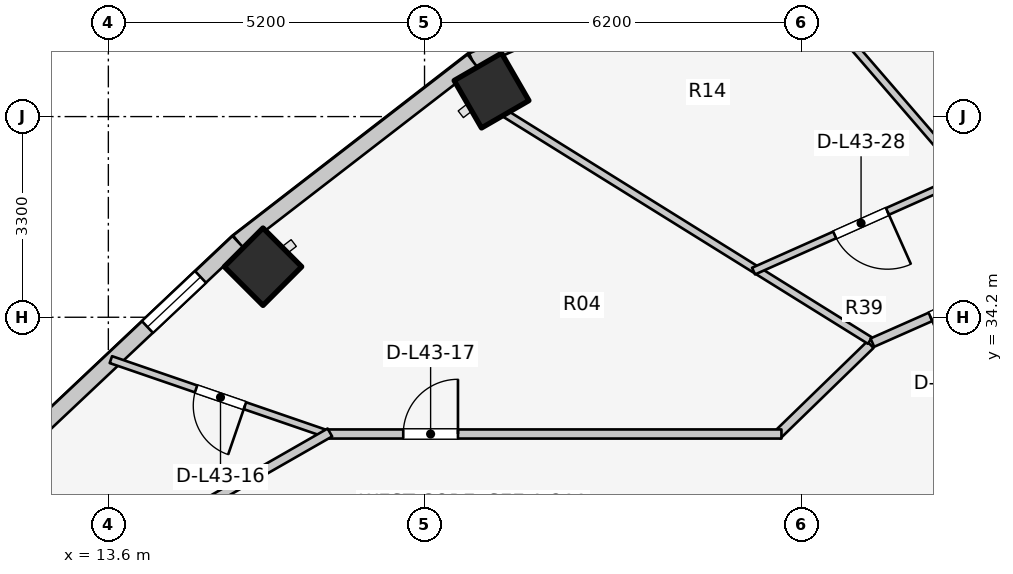
"""IFC4 building model, lengths in metres.
Left out: names, types, materials, properties, quantities, classifications, styles, units other than length and angle.
Written with IfcOpenShell. Run it as: python <this file> out.ifc"""

import sys

from ifc_helpers import new_model, si_unit, direction, frame, frame_2d, origin, origin_2d, place, context, subcontext, project, spatial, rectangle, extrude, element, fill, save


model = new_model("IFC4")
c1 = context("Model", 3, precision=1e-05, world=origin(), true_north=direction((0.0, 1.0)))
c2 = subcontext(c1, "Body", "Model", "MODEL_VIEW")
j1 = project(units=[si_unit("LENGTHUNIT", "METRE"), si_unit("PLANEANGLEUNIT", "RADIAN")], contexts=[c1])
p1 = place(None, origin())
s1 = spatial("IfcSite", under=j1, at=p1, CompositionType="ELEMENT")
p2 = place(p1, origin())
s2 = spatial("IfcBuilding", under=s1, at=p2, CompositionType="ELEMENT")
p3 = place(p2, frame((0.0, 0.0, 143.6)))
s3 = spatial("IfcBuildingStorey", under=s2, at=p3, CompositionType="ELEMENT", Elevation=143.6)
for number, where, z_axis, x_axis in (
    (1, (19.902, 37.928, 0.0), (0.0, 0.0, 1.0), (-0.5, 0.866, 0.0)),
    (2, (16.143, 35.031, 0.0), (0.0, 0.0, 1.0), (-0.707, 0.707, 0.0)),
):
    element("IfcColumn", number, at=place(p3, frame(where, z_axis=z_axis, x_axis=x_axis)), inside=s3, PredefinedType="COLUMN", context=c2, shape_type="SweptSolid", body=[
        extrude(rectangle(XDim=0.9, YDim=0.9, at=origin_2d()), origin(), (0.0, 0.0, 1.0), 3.1),
    ])
p4 = place(p3, frame((24.635, 40.685, 0.0), z_axis=(0.0, 0.0, 1.0), x_axis=(-0.912353637112, -0.409403029847, 0.0)))
e3 = element("IfcWall", 3, at=p4, inside=s3, PredefinedType="STANDARD", context=c2, shape_type="SweptSolid", body=[
    extrude(rectangle(XDim=5.533, YDim=0.26, at=frame_2d((2.766, 0.0))), origin(), (0.0, 0.0, 1.0), 2.85),
])
p5 = place(p4, frame((2.016, 0.0, 0.75)))
e4 = element("IfcOpeningElement", 4, at=p5, cuts=e3, PredefinedType="OPENING", context=c2, shape_type="SweptSolid", body=[
    extrude(rectangle(XDim=1.5, YDim=1.6, at=frame_2d((0.75, 0.8))), frame((0.0, 0.14, 0.0), z_axis=(0.0, -1.0, 0.0), x_axis=(1.0, 0.0, 0.0)), (0.0, 0.0, 1.0), 0.28),
])
p6 = place(p3, frame((19.587, 38.419, 0.0), z_axis=(0.0, 0.0, 1.0), x_axis=(-0.791460185804, -0.611220724687, 0.0)))
e5 = element("IfcWall", 5, at=p6, inside=s3, PredefinedType="STANDARD", context=c2, shape_type="SweptSolid", body=[
    extrude(rectangle(XDim=4.872, YDim=0.26, at=frame_2d((2.436, 0.0))), origin(), (0.0, 0.0, 1.0), 2.85),
])
p7 = place(p3, frame((15.731, 35.441, 0.0), z_axis=(0.0, 0.0, 1.0), x_axis=(-0.727667301037, -0.68593024354, 0.0)))
e6 = element("IfcWall", 6, at=p7, inside=s3, PredefinedType="STANDARD", context=c2, shape_type="SweptSolid", body=[
    extrude(rectangle(XDim=4.604, YDim=0.26, at=frame_2d((2.302, 0.0))), origin(), (0.0, 0.0, 1.0), 2.85),
])
p8 = place(p7, frame((0.844, 0.0, 0.75)))
e7 = element("IfcOpeningElement", 7, at=p8, cuts=e6, PredefinedType="OPENING", context=c2, shape_type="SweptSolid", body=[
    extrude(rectangle(XDim=1.2, YDim=1.5, at=frame_2d((0.6, 0.75))), frame((0.0, 0.14, 0.0), z_axis=(0.0, -1.0, 0.0), x_axis=(1.0, 0.0, 0.0)), (0.0, 0.0, 1.0), 0.28),
])
p9 = place(p3, frame((17.247, 32.264, 0.0), z_axis=(0.0, 0.0, 1.0), x_axis=(-0.945683523506, 0.325088716151, 0.0)))
e8 = element("IfcWall", 8, at=p9, inside=s3, PredefinedType="MOVABLE", context=c2, shape_type="SweptSolid", body=[
    extrude(rectangle(XDim=3.813, YDim=0.12, at=frame_2d((1.906, 0.0))), origin(), (0.0, 0.0, 1.0), 2.22),
])
p10 = place(p9, frame((1.481, 0.0, 0.0)))
e9 = element("IfcOpeningElement", 9, at=p10, cuts=e8, PredefinedType="OPENING", context=c2, shape_type="SweptSolid", body=[
    extrude(rectangle(XDim=0.85, YDim=2.05, at=frame_2d((0.425, 1.025))), frame((0.0, 0.07, 0.0), z_axis=(0.0, -1.0, 0.0), x_axis=(1.0, 0.0, 0.0)), (0.0, 0.0, 1.0), 0.14),
])
p11 = place(p3, frame((26.133, 33.749, 0.0), z_axis=(0.0, 0.0, 1.0), x_axis=(-0.717419568599, -0.696641344302, 0.0)))
e10 = element("IfcWall", 10, at=p11, inside=s3, PredefinedType="PARTITIONING", context=c2, shape_type="SweptSolid", body=[
    extrude(rectangle(XDim=2.138, YDim=0.15, at=frame_2d((1.069, 0.0))), origin(), (0.0, 0.0, 1.0), 2.299),
])
p12 = place(p3, frame((17.15, 32.28, 0.0), z_axis=(0.0, 0.0, 1.0), x_axis=(1.0, 0.0, 0.0)))
e11 = element("IfcWall", 11, at=p12, inside=s3, PredefinedType="PARTITIONING", context=c2, shape_type="SweptSolid", body=[
    extrude(rectangle(XDim=7.52, YDim=0.15, at=frame_2d((3.76, 0.0))), origin(), (0.0, 0.0, 1.0), 2.299),
])
p13 = place(p12, frame((1.3, 0.0, 0.0)))
e12 = element("IfcOpeningElement", 12, at=p13, cuts=e11, PredefinedType="OPENING", context=c2, shape_type="SweptSolid", body=[
    extrude(rectangle(XDim=0.9, YDim=2.1, at=frame_2d((0.45, 1.05))), frame((0.0, 0.085, 0.0), z_axis=(0.0, -1.0, 0.0), x_axis=(1.0, 0.0, 0.0)), (0.0, 0.0, 1.0), 0.17),
])
p14 = place(p3, frame((17.243, 32.305, 0.0), z_axis=(0.0, 0.0, 1.0), x_axis=(-0.867991349648, -0.496579315857, 0.0)))
e13 = element("IfcWall", 13, at=p14, inside=s3, PredefinedType="PARTITIONING", context=c2, shape_type="SweptSolid", body=[
    extrude(rectangle(XDim=2.567, YDim=0.15, at=frame_2d((1.283, 0.0))), origin(), (0.0, 0.0, 1.0), 2.22),
])
p15 = place(p3, frame((28.947, 35.073, 0.0), z_axis=(0.0, 0.0, 1.0), x_axis=(-0.653779283332, 0.756685303601, 0.0)))
e14 = element("IfcWall", 14, at=p15, inside=s3, PredefinedType="PARTITIONING", context=c2, shape_type="SweptSolid", body=[
    extrude(rectangle(XDim=6.14, YDim=0.125, at=frame_2d((3.07, 0.0))), origin(), (0.0, 0.0, 1.0), 2.299),
])
p16 = place(p3, frame((26.125, 33.816, 0.0), z_axis=(0.0, 0.0, 1.0), x_axis=(-0.849008457073, 0.528379257559, 0.0)))
e15 = element("IfcWall", 15, at=p16, inside=s3, PredefinedType="PARTITIONING", context=c2, shape_type="SweptSolid", body=[
    extrude(rectangle(XDim=7.077, YDim=0.125, at=frame_2d((3.539, 0.0))), origin(), (0.0, 0.0, 1.0), 2.299),
])
p17 = place(p3, frame((27.748, 36.535, 0.0), z_axis=(0.0, 0.0, 1.0), x_axis=(-0.913405492862, -0.407050863665, 0.0)))
e16 = element("IfcWall", 16, at=p17, inside=s3, PredefinedType="MOVABLE", context=c2, shape_type="SweptSolid", body=[
    extrude(rectangle(XDim=3.872, YDim=0.12, at=frame_2d((1.936, 0.0))), origin(), (0.0, 0.0, 1.0), 2.299),
])
p18 = place(p17, frame((1.461, 0.0, 0.0)))
e17 = element("IfcOpeningElement", 17, at=p18, cuts=e16, PredefinedType="OPENING", context=c2, shape_type="SweptSolid", body=[
    extrude(rectangle(XDim=0.95, YDim=2.1, at=frame_2d((0.475, 1.05))), frame((0.0, 0.07, 0.0), z_axis=(0.0, -1.0, 0.0), x_axis=(1.0, 0.0, 0.0)), (0.0, 0.0, 1.0), 0.14),
])
p19 = place(p3, frame((28.991, 35.034, 0.0), z_axis=(0.0, 0.0, 1.0), x_axis=(-0.91445214467, -0.404694051239, 0.0)))
e18 = element("IfcWall", 18, at=p19, inside=s3, PredefinedType="PARTITIONING", context=c2, shape_type="SweptSolid", body=[
    extrude(rectangle(XDim=3.091, YDim=0.15, at=frame_2d((1.545, 0.0))), origin(), (0.0, 0.0, 1.0), 2.299),
])
p20 = place(p19, frame((1.045, 0.0, 0.0)))
e19 = element("IfcOpeningElement", 19, at=p20, cuts=e18, PredefinedType="OPENING", context=c2, shape_type="SweptSolid", body=[
    extrude(rectangle(XDim=1.0, YDim=2.1, at=frame_2d((0.5, 1.05))), frame((0.0, 0.085, 0.0), z_axis=(0.0, -1.0, 0.0), x_axis=(1.0, 0.0, 0.0)), (0.0, 0.0, 1.0), 0.17),
])
p21 = place(p8, origin())
e20 = element("IfcWindow", 20, at=p21, inside=s3, PartitioningType="SINGLE_PANEL", PredefinedType="WINDOW", context=c2, shape_type="SweptSolid", body=[
    extrude(rectangle(XDim=1.2, YDim=1.5, at=frame_2d((0.6, 0.75))), frame((0.0, 0.03, 0.0), z_axis=(0.0, -1.0, 0.0), x_axis=(1.0, 0.0, 0.0)), (0.0, 0.0, 1.0), 0.06),
])
fill(e7, e20)
p22 = place(p10, origin())
e21 = element("IfcDoor", 21, at=p22, inside=s3, OperationType="SINGLE_SWING_LEFT", PredefinedType="DOOR", context=c2, shape_type="SweptSolid", body=[
    extrude(rectangle(XDim=0.85, YDim=2.05, at=frame_2d((0.425, 1.025))), frame((0.0, 0.025, 0.0), z_axis=(0.0, -1.0, 0.0), x_axis=(1.0, 0.0, 0.0)), (0.0, 0.0, 1.0), 0.05),
])
fill(e9, e21)
p23 = place(p13, origin())
e22 = element("IfcDoor", 22, at=p23, inside=s3, OperationType="SINGLE_SWING_RIGHT", PredefinedType="DOOR", context=c2, shape_type="SweptSolid", body=[
    extrude(rectangle(XDim=0.9, YDim=2.1, at=frame_2d((0.45, 1.05))), frame((0.0, 0.025, 0.0), z_axis=(0.0, -1.0, 0.0), x_axis=(1.0, 0.0, 0.0)), (0.0, 0.0, 1.0), 0.05),
])
fill(e12, e22)
p24 = place(p18, origin())
e23 = element("IfcDoor", 23, at=p24, inside=s3, OperationType="SINGLE_SWING_LEFT", PredefinedType="DOOR", context=c2, shape_type="SweptSolid", body=[
    extrude(rectangle(XDim=0.95, YDim=2.1, at=frame_2d((0.475, 1.05))), frame((0.0, 0.025, 0.0), z_axis=(0.0, -1.0, 0.0), x_axis=(1.0, 0.0, 0.0)), (0.0, 0.0, 1.0), 0.05),
])
fill(e17, e23)
p25 = place(p20, origin())
e24 = element("IfcDoor", 24, at=p25, inside=s3, OperationType="SINGLE_SWING_RIGHT", PredefinedType="DOOR", context=c2, shape_type="SweptSolid", body=[
    extrude(rectangle(XDim=1.0, YDim=2.1, at=frame_2d((0.5, 1.05))), frame((0.0, 0.025, 0.0), z_axis=(0.0, -1.0, 0.0), x_axis=(1.0, 0.0, 0.0)), (0.0, 0.0, 1.0), 0.05),
])
fill(e19, e24)
save(model, sys.argv[1])
